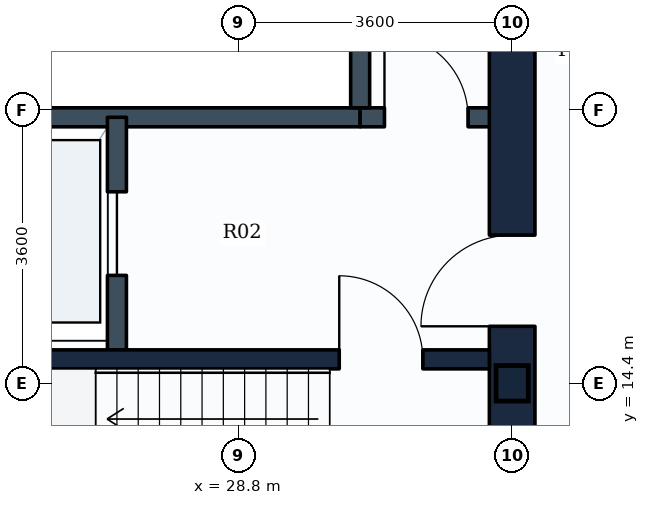
"""IFC4 building model, lengths in metres.
Left out: names, types, materials, properties, quantities, classifications, styles, units other than length and angle.
Written with IfcOpenShell. Run it as: python <this file> out.ifc"""

import sys

from ifc_helpers import new_model, si_unit, direction, frame, frame_2d, origin, origin_2d, place, context, subcontext, project, spatial, rectangle, i_section, extrude, element, fill, save


model = new_model("IFC4")
c1 = context("Model", 3, precision=1e-05, world=origin(), true_north=direction((0.0, 1.0)))
c2 = subcontext(c1, "Body", "Model", "MODEL_VIEW")
j1 = project(units=[si_unit("LENGTHUNIT", "METRE"), si_unit("PLANEANGLEUNIT", "RADIAN")], contexts=[c1])
p1 = place(None, origin())
s1 = spatial("IfcSite", under=j1, at=p1, CompositionType="ELEMENT")
p2 = place(p1, origin())
s2 = spatial("IfcBuilding", under=s1, at=p2, CompositionType="ELEMENT")
p3 = place(p2, frame((0.0, 0.0, 70.8)))
s3 = spatial("IfcBuildingStorey", under=s2, at=p3, CompositionType="ELEMENT", Elevation=70.8)
p4 = place(p3, frame((32.4, 14.4, 0.0), z_axis=(0.0, 0.0, 1.0), x_axis=(1.0, 0.0, 0.0)))
e1 = element("IfcColumn", 1, at=p4, inside=s3, PredefinedType="COLUMN", context=c2, shape_type="SweptSolid", body=[
    extrude(i_section(OverallWidth=0.424, OverallDepth=0.467, WebThickness=0.033, FlangeThickness=0.053, FilletRadius=0.015, at=origin_2d()), origin(), (0.0, 0.0, 1.0), 3.9),
])
p5 = place(p3, frame((32.4, 10.8, 0.0), z_axis=(0.0, 0.0, 1.0), x_axis=(0.0, 1.0, 0.0)))
e2 = element("IfcWall", 2, at=p5, inside=s3, PredefinedType="SHEAR", context=c2, shape_type="SweptSolid", body=[
    extrude(rectangle(XDim=14.4, YDim=0.6, at=frame_2d((7.2, 0.0))), origin(), (0.0, 0.0, 1.0), 3.58),
])
p6 = place(p5, frame((4.35, 0.0, 0.0)))
e3 = element("IfcOpeningElement", 3, at=p6, cuts=e2, PredefinedType="OPENING", context=c2, shape_type="SweptSolid", body=[
    extrude(rectangle(XDim=1.2, YDim=2.1, at=frame_2d((0.6, 1.05))), frame((0.0, 0.31, 0.0), z_axis=(0.0, -1.0, 0.0), x_axis=(1.0, 0.0, 0.0)), (0.0, 0.0, 1.0), 0.62),
])
p7 = place(p5, frame((10.0, 0.0, 0.0)))
e4 = element("IfcOpeningElement", 4, at=p7, cuts=e2, PredefinedType="OPENING", context=c2, shape_type="SweptSolid", body=[
    extrude(rectangle(XDim=1.2, YDim=2.1, at=frame_2d((0.6, 1.05))), frame((0.0, 0.31, 0.0), z_axis=(0.0, -1.0, 0.0), x_axis=(1.0, 0.0, 0.0)), (0.0, 0.0, 1.0), 0.62),
])
p8 = place(p3, frame((23.35, 14.715, 0.0), z_axis=(0.0, 0.0, 1.0), x_axis=(1.0, 0.0, 0.0)))
e5 = element("IfcWall", 5, at=p8, inside=s3, PredefinedType="SHEAR", context=c2, shape_type="SweptSolid", body=[
    extrude(rectangle(XDim=8.75, YDim=0.25, at=frame_2d((4.375, 0.0))), origin(), (0.0, 0.0, 1.0), 3.58),
])
p9 = place(p8, frame((6.775, 0.0, 0.0)))
e6 = element("IfcOpeningElement", 6, at=p9, cuts=e5, PredefinedType="OPENING", context=c2, shape_type="SweptSolid", body=[
    extrude(rectangle(XDim=1.1, YDim=2.1, at=frame_2d((0.55, 1.05))), frame((0.0, 0.135, 0.0), z_axis=(0.0, -1.0, 0.0), x_axis=(1.0, 0.0, 0.0)), (0.0, 0.0, 1.0), 0.27),
])
p10 = place(p3, frame((21.88, 17.9, 0.0), z_axis=(0.0, 0.0, 1.0), x_axis=(1.0, 0.0, 0.0)))
e7 = element("IfcWall", 7, at=p10, inside=s3, PredefinedType="PARTITIONING", context=c2, shape_type="SweptSolid", body=[
    extrude(rectangle(XDim=8.52, YDim=0.25, at=frame_2d((4.26, 0.0))), origin(), (0.0, 0.0, 1.0), 3.565),
])
p11 = place(p3, frame((30.4, 17.9, 0.0), z_axis=(0.0, 0.0, 1.0), x_axis=(1.0, 0.0, 0.0)))
e8 = element("IfcWall", 8, at=p11, inside=s3, PredefinedType="PARTITIONING", context=c2, shape_type="SweptSolid", body=[
    extrude(rectangle(XDim=1.75, YDim=0.25, at=frame_2d((0.875, 0.0))), origin(), (0.0, 0.0, 1.0), 3.565),
])
p12 = place(p11, frame((0.32, 0.0, 0.0)))
e9 = element("IfcOpeningElement", 9, at=p12, cuts=e8, PredefinedType="OPENING", context=c2, shape_type="SweptSolid", body=[
    extrude(rectangle(XDim=1.1, YDim=2.1, at=frame_2d((0.55, 1.05))), frame((0.0, 0.135, 0.0), z_axis=(0.0, -1.0, 0.0), x_axis=(1.0, 0.0, 0.0)), (0.0, 0.0, 1.0), 0.27),
])
p13 = place(p3, frame((27.2, 14.84, 0.0), z_axis=(0.0, 0.0, 1.0), x_axis=(0.0, 1.0, 0.0)))
e10 = element("IfcWall", 10, at=p13, inside=s3, PredefinedType="PARTITIONING", context=c2, shape_type="SweptSolid", body=[
    extrude(rectangle(XDim=3.06, YDim=0.25, at=frame_2d((1.53, 0.0))), origin(), (0.0, 0.0, 1.0), 3.565),
])
p14 = place(p13, frame((0.98, 0.0, 0.0)))
e11 = element("IfcOpeningElement", 11, at=p14, cuts=e10, PredefinedType="OPENING", context=c2, shape_type="SweptSolid", body=[
    extrude(rectangle(XDim=1.1, YDim=2.1, at=frame_2d((0.55, 1.05))), frame((0.0, 0.135, 0.0), z_axis=(0.0, -1.0, 0.0), x_axis=(1.0, 0.0, 0.0)), (0.0, 0.0, 1.0), 0.27),
])
p15 = place(p3, frame((30.4, 18.025, 0.0), z_axis=(0.0, 0.0, 1.0), x_axis=(0.0, 1.0, 0.0)))
e12 = element("IfcWall", 12, at=p15, inside=s3, PredefinedType="PARTITIONING", context=c2, shape_type="SweptSolid", body=[
    extrude(rectangle(XDim=2.27, YDim=0.25, at=frame_2d((1.135, 0.0))), origin(), (0.0, 0.0, 1.0), 3.565),
])
p16 = place(p9, origin())
e13 = element("IfcDoor", 13, at=p16, inside=s3, OperationType="SINGLE_SWING_LEFT", PredefinedType="DOOR", context=c2, shape_type="SweptSolid", body=[
    extrude(rectangle(XDim=1.1, YDim=2.1, at=frame_2d((0.55, 1.05))), frame((0.0, 0.025, 0.0), z_axis=(0.0, -1.0, 0.0), x_axis=(1.0, 0.0, 0.0)), (0.0, 0.0, 1.0), 0.05),
])
fill(e6, e13)
p17 = place(p14, origin())
e14 = element("IfcDoor", 14, at=p17, inside=s3, OperationType="SLIDING_TO_LEFT", PredefinedType="DOOR", context=c2, shape_type="SweptSolid", body=[
    extrude(rectangle(XDim=1.1, YDim=2.1, at=frame_2d((0.55, 1.05))), frame((0.0, 0.025, 0.0), z_axis=(0.0, -1.0, 0.0), x_axis=(1.0, 0.0, 0.0)), (0.0, 0.0, 1.0), 0.05),
])
fill(e11, e14)
p18 = place(p6, origin())
e15 = element("IfcDoor", 15, at=p18, inside=s3, OperationType="SINGLE_SWING_LEFT", PredefinedType="DOOR", context=c2, shape_type="SweptSolid", body=[
    extrude(rectangle(XDim=1.2, YDim=2.1, at=frame_2d((0.6, 1.05))), frame((0.0, 0.025, 0.0), z_axis=(0.0, -1.0, 0.0), x_axis=(1.0, 0.0, 0.0)), (0.0, 0.0, 1.0), 0.05),
])
fill(e3, e15)
p19 = place(p12, origin())
e16 = element("IfcDoor", 16, at=p19, inside=s3, OperationType="SINGLE_SWING_LEFT", PredefinedType="DOOR", context=c2, shape_type="SweptSolid", body=[
    extrude(rectangle(XDim=1.1, YDim=2.1, at=frame_2d((0.55, 1.05))), frame((0.0, 0.025, 0.0), z_axis=(0.0, -1.0, 0.0), x_axis=(1.0, 0.0, 0.0)), (0.0, 0.0, 1.0), 0.05),
])
fill(e9, e16)
save(model, sys.argv[1])
